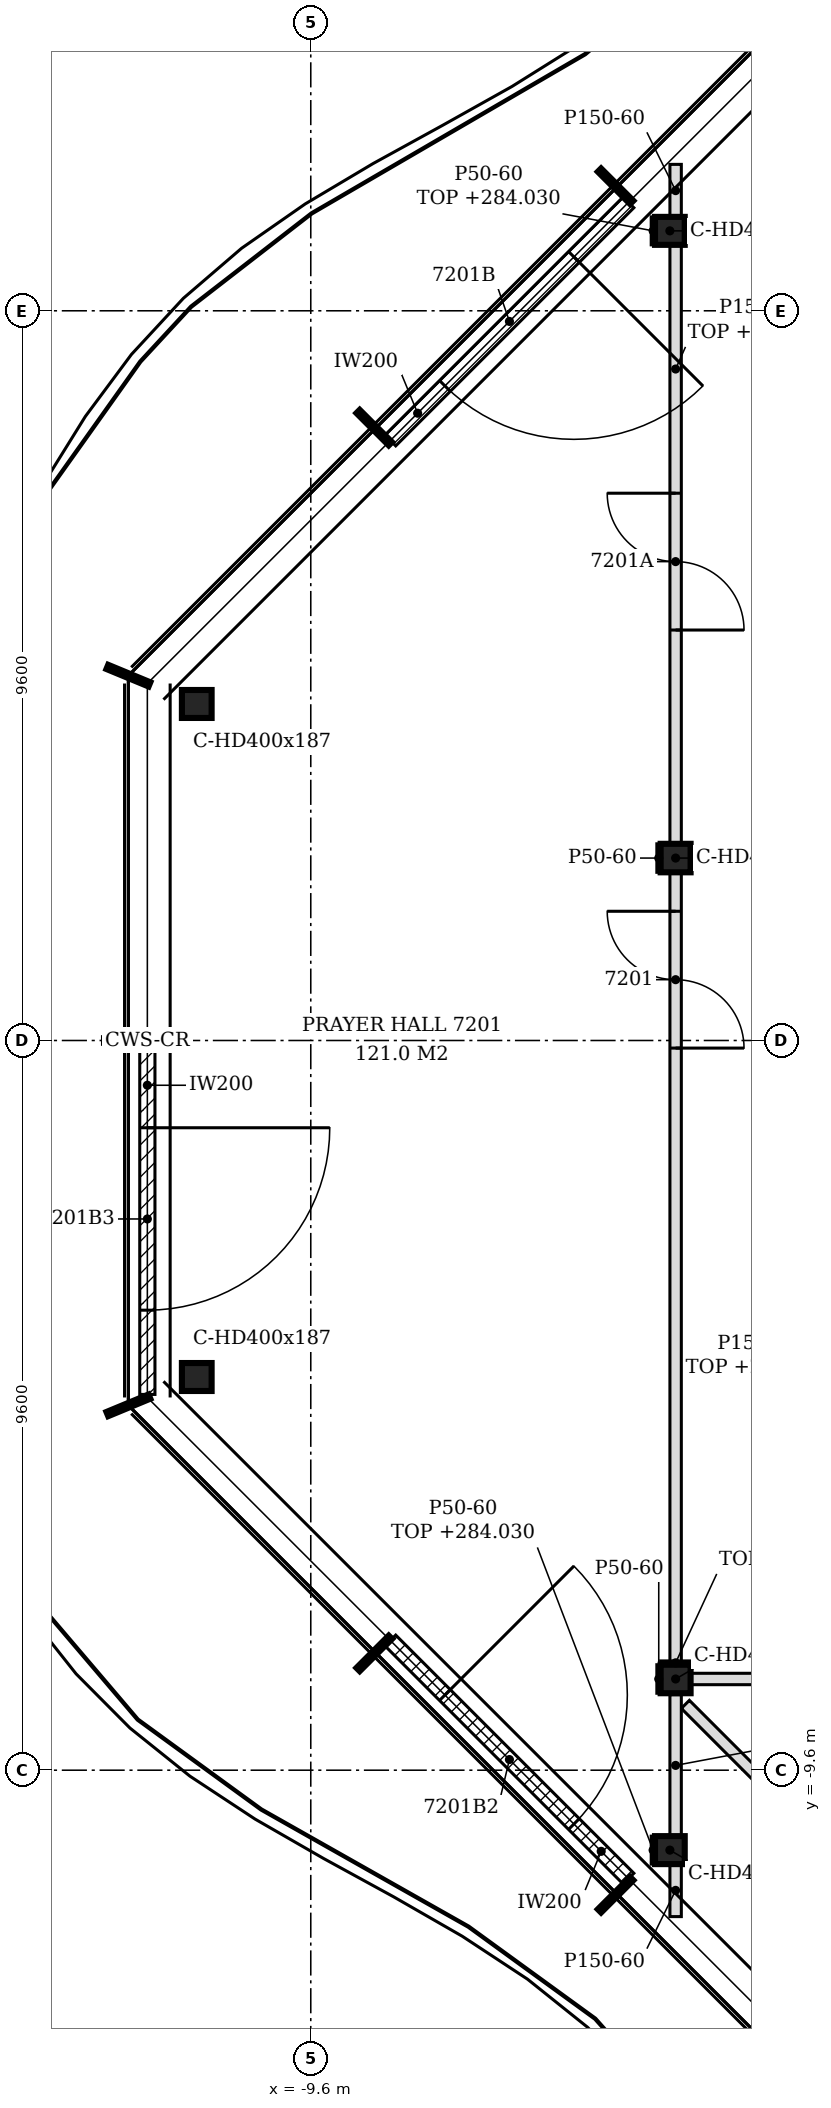
"""IFC4 building model, lengths in metres.
Left out: names, types, materials, properties, quantities, classifications, styles, units other than length and angle.
Written with IfcOpenShell. Run it as: python <this file> out.ifc"""

import sys

from ifc_helpers import new_model, si_unit, direction, frame, frame_2d, origin, origin_2d, place, context, subcontext, project, spatial, polyline, rectangle, i_section, outline, extrude, element, fill, save


model = new_model("IFC4")
c1 = context("Model", 3, precision=1e-05, world=origin(), true_north=direction((0.0, 1.0)))
c2 = subcontext(c1, "Body", "Model", "MODEL_VIEW")
j1 = project(units=[si_unit("LENGTHUNIT", "METRE"), si_unit("PLANEANGLEUNIT", "RADIAN")], contexts=[c1])
p1 = place(None, origin())
s1 = spatial("IfcSite", under=j1, at=p1, CompositionType="ELEMENT")
p2 = place(p1, origin())
s2 = spatial("IfcBuilding", under=s1, at=p2, CompositionType="ELEMENT")
p3 = place(p2, frame((0.0, 0.0, 281.4)))
s3 = spatial("IfcBuildingStorey", under=s2, at=p3, CompositionType="ELEMENT", Elevation=281.4)
for number, where, z_axis, x_axis in (
    (1, (-4.876, 10.652, -0.15), (0.0, 0.0, 1.0), (1.0, 0.0, 0.0)),
    (2, (-11.1, 4.427, -0.15), (0.0, 0.0, 1.0), (1.0, 0.0, 0.0)),
    (3, (-11.1, -4.427, -0.15), (0.0, 0.0, 1.0), (1.0, 0.0, 0.0)),
    (4, (-4.876, -10.652, -0.15), (0.0, 0.0, 1.0), (1.0, 0.0, 0.0)),
):
    element("IfcColumn", number, at=place(p3, frame(where, z_axis=z_axis, x_axis=x_axis)), inside=s3, PredefinedType="COLUMN", context=c2, shape_type="SweptSolid", body=[
        extrude(i_section(OverallWidth=0.391, OverallDepth=0.368, WebThickness=0.015, FlangeThickness=0.024, FilletRadius=0.015, at=origin_2d()), origin(), (0.0, 0.0, 1.0), 3.6),
    ])
for number, where, z_axis, x_axis in (
    (5, (-4.8, -8.4, -0.15), (0.0, 0.0, 1.0), (1.0, 0.0, 0.0)),
    (6, (-4.8, 2.4, -0.15), (0.0, 0.0, 1.0), (1.0, 0.0, 0.0)),
):
    element("IfcColumn", number, at=place(p3, frame(where, z_axis=z_axis, x_axis=x_axis)), inside=s3, PredefinedType="COLUMN", context=c2, shape_type="SweptSolid", body=[
        extrude(i_section(OverallWidth=0.394, OverallDepth=0.375, WebThickness=0.017, FlangeThickness=0.028, FilletRadius=0.015, at=origin_2d()), origin(), (0.0, 0.0, 1.0), 3.6),
    ])
p4 = place(p3, frame((-5.42, 11.026, 0.0), z_axis=(0.0, 0.0, 1.0), x_axis=(-0.707134329907, -0.707079231393, 0.0)))
e7 = element("IfcWall", 7, at=p4, inside=s3, PredefinedType="NOTDEFINED", context=c2, shape_type="SweptSolid", body=[
    extrude(rectangle(XDim=4.431, YDim=0.2, at=frame_2d((2.215, 0.0))), origin(), (0.0, 0.0, 1.0), 3.45),
])
p5 = place(p4, frame((1.015, 0.0, 0.0)))
e8 = element("IfcOpeningElement", 8, at=p5, cuts=e7, PredefinedType="OPENING", context=c2, shape_type="SweptSolid", body=[
    extrude(rectangle(XDim=2.4, YDim=2.4, at=frame_2d((1.2, 1.2))), frame((0.0, 0.11, 0.0), z_axis=(0.0, -1.0, 0.0), x_axis=(1.0, 0.0, 0.0)), (0.0, 0.0, 1.0), 0.22),
])
p6 = place(p3, frame((-11.75, -0.03, 0.0), z_axis=(0.0, 0.0, 1.0), x_axis=(0.0, -1.0, 0.0)))
e9 = element("IfcWall", 9, at=p6, inside=s3, PredefinedType="NOTDEFINED", context=c2, shape_type="SweptSolid", body=[
    extrude(rectangle(XDim=4.626, YDim=0.2, at=frame_2d((2.313, 0.0))), origin(), (0.0, 0.0, 1.0), 3.45),
])
p7 = place(p6, frame((1.118, 0.0, 0.0)))
e10 = element("IfcOpeningElement", 10, at=p7, cuts=e9, PredefinedType="OPENING", context=c2, shape_type="SweptSolid", body=[
    extrude(rectangle(XDim=2.4, YDim=2.4, at=frame_2d((1.2, 1.2))), frame((0.0, 0.11, 0.0), z_axis=(0.0, -1.0, 0.0), x_axis=(1.0, 0.0, 0.0)), (0.0, 0.0, 1.0), 0.22),
])
p8 = place(p3, frame((-8.553, -7.893, 0.0), z_axis=(0.0, 0.0, 1.0), x_axis=(0.707134329907, -0.707079231393, 0.0)))
e11 = element("IfcWall", 11, at=p8, inside=s3, PredefinedType="NOTDEFINED", context=c2, shape_type="SweptSolid", body=[
    extrude(rectangle(XDim=4.431, YDim=0.2, at=frame_2d((2.215, 0.0))), origin(), (0.0, 0.0, 1.0), 3.45),
])
p9 = place(p8, frame((1.015, 0.0, 0.0)))
e12 = element("IfcOpeningElement", 12, at=p9, cuts=e11, PredefinedType="OPENING", context=c2, shape_type="SweptSolid", body=[
    extrude(rectangle(XDim=2.4, YDim=2.4, at=frame_2d((1.2, 1.2))), frame((0.0, 0.11, 0.0), z_axis=(0.0, -1.0, 0.0), x_axis=(1.0, 0.0, 0.0)), (0.0, 0.0, 1.0), 0.22),
])
p10 = place(p3, frame((-0.128, -13.278, 0.0), z_axis=(0.0, 0.0, 1.0), x_axis=(-0.707106781187, 0.707106781187, 0.0)))
e13 = element("IfcWall", 13, at=p10, inside=s3, PredefinedType="PARTITIONING", context=c2, shape_type="SweptSolid", body=[
    extrude(rectangle(XDim=6.427, YDim=0.15, at=frame_2d((3.213, 0.0))), origin(), (0.0, 0.0, 1.0), 3.03),
])
p11 = place(p3, frame((-4.8, -11.526, 0.0), z_axis=(0.0, 0.0, 1.0), x_axis=(0.0, 1.0, 0.0)))
e14 = element("IfcWall", 14, at=p11, inside=s3, PredefinedType="PARTITIONING", context=c2, shape_type="SweptSolid", body=[
    extrude(outline(polyline([(0.0, 0.0), (0.691, 0.0), (0.691, 2.63), (0.229, 2.63), (0.227, 3.45), (0.0, 3.45), (0.0, 0.0)])), frame((0.0, 0.075, 0.0), z_axis=(0.0, -1.0, 0.0), x_axis=(1.0, 0.0, 0.0)), (0.0, 0.0, 1.0), 0.15),
])
p12 = place(p3, frame((-4.8, -10.468, 0.0), z_axis=(0.0, 0.0, 1.0), x_axis=(0.0, 1.0, 0.0)))
e15 = element("IfcWall", 15, at=p12, inside=s3, PredefinedType="PARTITIONING", context=c2, shape_type="SweptSolid", body=[
    extrude(outline(polyline([(0.0, 0.0), (1.862, 0.0), (1.862, 3.03), (0.31, 3.03), (0.308, 2.63), (0.066, 2.63), (0.064, 3.03), (0.0, 3.03), (0.0, 0.0)])), frame((0.0, 0.075, 0.0), z_axis=(0.0, -1.0, 0.0), x_axis=(1.0, 0.0, 0.0)), (0.0, 0.0, 1.0), 0.15),
])
p13 = place(p3, frame((-4.603, -8.4, 0.0), z_axis=(0.0, 0.0, 1.0), x_axis=(1.0, 0.0, 0.0)))
e16 = element("IfcWall", 16, at=p13, inside=s3, PredefinedType="PARTITIONING", context=c2, shape_type="SweptSolid", body=[
    extrude(rectangle(XDim=4.678, YDim=0.15, at=frame_2d((2.339, 0.0))), origin(), (0.0, 0.0, 1.0), 2.83),
])
p14 = place(p3, frame((-4.8, -8.212, 0.0), z_axis=(0.0, 0.0, 1.0), x_axis=(0.0, 1.0, 0.0)))
e17 = element("IfcWall", 17, at=p14, inside=s3, PredefinedType="PARTITIONING", context=c2, shape_type="SweptSolid", body=[
    extrude(rectangle(XDim=10.425, YDim=0.15, at=frame_2d((5.212, 0.0))), origin(), (0.0, 0.0, 1.0), 2.83),
])
p15 = place(p14, frame((8.113, 0.0, 0.0)))
e18 = element("IfcOpeningElement", 18, at=p15, cuts=e17, PredefinedType="OPENING", context=c2, shape_type="SweptSolid", body=[
    extrude(rectangle(XDim=1.8, YDim=2.1, at=frame_2d((0.9, 1.05))), frame((0.0, 0.085, 0.0), z_axis=(0.0, -1.0, 0.0), x_axis=(1.0, 0.0, 0.0)), (0.0, 0.0, 1.0), 0.17),
])
p16 = place(p3, frame((-4.8, 2.587, 0.0), z_axis=(0.0, 0.0, 1.0), x_axis=(0.0, 1.0, 0.0)))
e19 = element("IfcWall", 19, at=p16, inside=s3, PredefinedType="PARTITIONING", context=c2, shape_type="SweptSolid", body=[
    extrude(outline(polyline([(0.0, 0.0), (7.88, 0.0), (7.88, 2.93), (7.814, 2.93), (7.812, 2.63), (7.57, 2.63), (7.568, 2.93), (0.0, 2.93), (0.0, 0.0)])), frame((0.0, 0.075, 0.0), z_axis=(0.0, -1.0, 0.0), x_axis=(1.0, 0.0, 0.0)), (0.0, 0.0, 1.0), 0.15),
])
p17 = place(p16, frame((2.812, 0.0, 0.0)))
e20 = element("IfcOpeningElement", 20, at=p17, cuts=e19, PredefinedType="OPENING", context=c2, shape_type="SweptSolid", body=[
    extrude(rectangle(XDim=1.8, YDim=2.1, at=frame_2d((0.9, 1.05))), frame((0.0, 0.085, 0.0), z_axis=(0.0, -1.0, 0.0), x_axis=(1.0, 0.0, 0.0)), (0.0, 0.0, 1.0), 0.17),
])
p18 = place(p3, frame((-4.8, 10.835, 0.0), z_axis=(0.0, 0.0, 1.0), x_axis=(0.0, 1.0, 0.0)))
e21 = element("IfcWall", 21, at=p18, inside=s3, PredefinedType="PARTITIONING", context=c2, shape_type="SweptSolid", body=[
    extrude(outline(polyline([(0.0, 0.0), (0.691, 0.0), (0.691, 3.45), (0.462, 3.45), (0.46, 2.63), (0.0, 2.63), (0.0, 0.0)])), frame((0.0, 0.075, 0.0), z_axis=(0.0, -1.0, 0.0), x_axis=(1.0, 0.0, 0.0)), (0.0, 0.0, 1.0), 0.15),
])
p19 = place(p3, frame((-5.096, -10.835, 0.0), z_axis=(0.0, 0.0, 1.0), x_axis=(0.0, 1.0, 0.0)))
e22 = element("IfcWall", 22, at=p19, inside=s3, PredefinedType="PARTITIONING", context=c2, shape_type="SweptSolid", body=[
    extrude(rectangle(XDim=0.368, YDim=0.05, at=frame_2d((0.184, 0.0))), origin(), (0.0, 0.0, 1.0), 2.63),
])
for number, where, z_axis, x_axis in (
    (23, (-5.022, -8.587, 0.0), (0.0, 0.0, 1.0), (0.0, 1.0, 0.0)),
    (24, (-5.022, 2.212, 0.0), (0.0, 0.0, 1.0), (0.0, 1.0, 0.0)),
):
    element("IfcWall", number, at=place(p3, frame(where, z_axis=z_axis, x_axis=x_axis)), inside=s3, PredefinedType="PARTITIONING", context=c2, shape_type="SweptSolid", body=[
        extrude(rectangle(XDim=0.375, YDim=0.05, at=frame_2d((0.188, 0.0))), origin(), (0.0, 0.0, 1.0), 3.45),
    ])
p20 = place(p3, frame((-5.096, 10.468, 0.0), z_axis=(0.0, 0.0, 1.0), x_axis=(0.0, 1.0, 0.0)))
e25 = element("IfcWall", 25, at=p20, inside=s3, PredefinedType="PARTITIONING", context=c2, shape_type="SweptSolid", body=[
    extrude(rectangle(XDim=0.368, YDim=0.05, at=frame_2d((0.184, 0.0))), origin(), (0.0, 0.0, 1.0), 2.63),
])
p21 = place(p3, frame((-4.997, -8.188, 0.0), z_axis=(0.0, 0.0, 1.0), x_axis=(1.0, 0.0, 0.0)))
e26 = element("IfcWall", 26, at=p21, inside=s3, PredefinedType="PARTITIONING", context=c2, shape_type="SweptSolid", body=[
    extrude(rectangle(XDim=0.394, YDim=0.05, at=frame_2d((0.197, 0.0))), origin(), (0.0, 0.0, 1.0), 2.83),
])
p22 = place(p5, origin())
e27 = element("IfcDoor", 27, at=p22, inside=s3, OperationType="SINGLE_SWING_LEFT", PredefinedType="DOOR", context=c2, shape_type="SweptSolid", body=[
    extrude(rectangle(XDim=2.4, YDim=2.4, at=frame_2d((1.2, 1.2))), frame((0.0, 0.025, 0.0), z_axis=(0.0, -1.0, 0.0), x_axis=(1.0, 0.0, 0.0)), (0.0, 0.0, 1.0), 0.05),
])
fill(e8, e27)
p23 = place(p7, origin())
e28 = element("IfcDoor", 28, at=p23, inside=s3, OperationType="SINGLE_SWING_LEFT", PredefinedType="DOOR", context=c2, shape_type="SweptSolid", body=[
    extrude(rectangle(XDim=2.4, YDim=2.4, at=frame_2d((1.2, 1.2))), frame((0.0, 0.025, 0.0), z_axis=(0.0, -1.0, 0.0), x_axis=(1.0, 0.0, 0.0)), (0.0, 0.0, 1.0), 0.05),
])
fill(e10, e28)
p24 = place(p9, origin())
e29 = element("IfcDoor", 29, at=p24, inside=s3, OperationType="SINGLE_SWING_LEFT", PredefinedType="DOOR", context=c2, shape_type="SweptSolid", body=[
    extrude(rectangle(XDim=2.4, YDim=2.4, at=frame_2d((1.2, 1.2))), frame((0.0, 0.025, 0.0), z_axis=(0.0, -1.0, 0.0), x_axis=(1.0, 0.0, 0.0)), (0.0, 0.0, 1.0), 0.05),
])
fill(e12, e29)
p25 = place(p15, origin())
e30 = element("IfcDoor", 30, at=p25, inside=s3, OperationType="DOUBLE_DOOR_SINGLE_SWING", PredefinedType="DOOR", context=c2, shape_type="SweptSolid", body=[
    extrude(rectangle(XDim=1.8, YDim=2.1, at=frame_2d((0.9, 1.05))), frame((0.0, 0.025, 0.0), z_axis=(0.0, -1.0, 0.0), x_axis=(1.0, 0.0, 0.0)), (0.0, 0.0, 1.0), 0.05),
])
fill(e18, e30)
p26 = place(p17, origin())
e31 = element("IfcDoor", 31, at=p26, inside=s3, OperationType="DOUBLE_DOOR_SINGLE_SWING", PredefinedType="DOOR", context=c2, shape_type="SweptSolid", body=[
    extrude(rectangle(XDim=1.8, YDim=2.1, at=frame_2d((0.9, 1.05))), frame((0.0, 0.025, 0.0), z_axis=(0.0, -1.0, 0.0), x_axis=(1.0, 0.0, 0.0)), (0.0, 0.0, 1.0), 0.05),
])
fill(e20, e31)
save(model, sys.argv[1])
